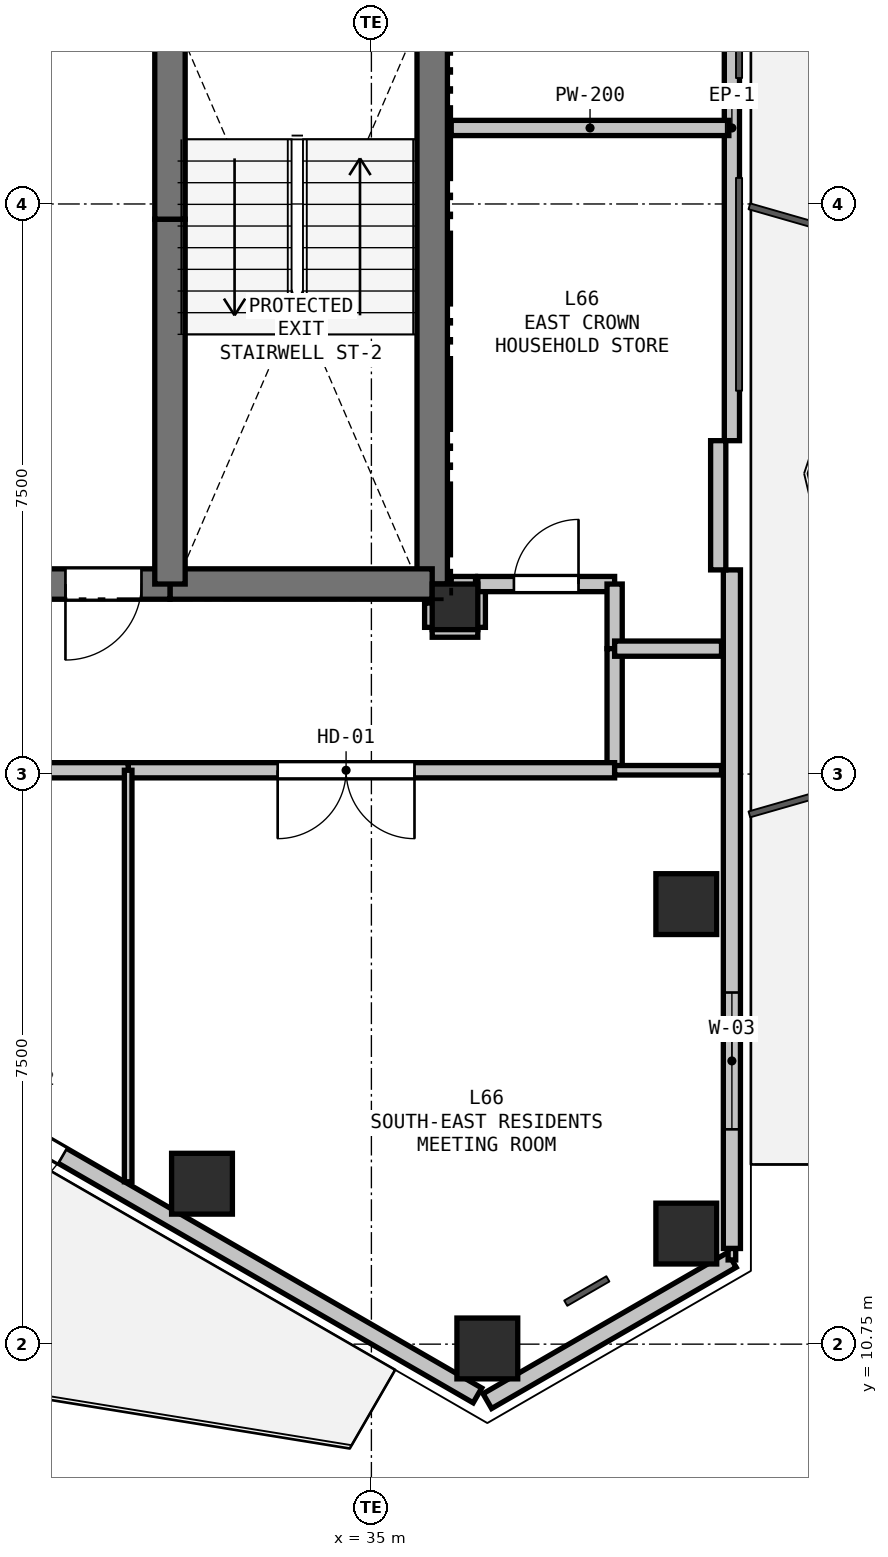
"""IFC4 building model, lengths in metres.
Left out: names, types, materials, properties, quantities, classifications, styles, units other than length and angle.
Written with IfcOpenShell. Run it as: python <this file> out.ifc"""

import sys

from ifc_helpers import new_model, si_unit, direction, frame, frame_2d, origin, origin_2d, place, context, subcontext, project, spatial, rectangle, hollow_rectangle, extrude, element, fill, save


model = new_model("IFC4")
c1 = context("Model", 3, precision=1e-05, world=origin(), true_north=direction((0.0, 1.0)))
c2 = subcontext(c1, "Body", "Model", "MODEL_VIEW")
j1 = project(units=[si_unit("LENGTHUNIT", "METRE"), si_unit("PLANEANGLEUNIT", "RADIAN")], contexts=[c1])
p1 = place(None, origin())
s1 = spatial("IfcSite", under=j1, at=p1, CompositionType="ELEMENT")
p2 = place(p1, origin())
s2 = spatial("IfcBuilding", under=s1, at=p2, CompositionType="ELEMENT")
p3 = place(p2, frame((0.0, 0.0, 236.4)))
s3 = spatial("IfcBuildingStorey", under=s2, at=p3, CompositionType="ELEMENT", Elevation=236.4)
p4 = place(p3, frame((36.1, 20.45, 0.0), z_axis=(0.0, 0.0, 1.0), x_axis=(1.0, 0.0, 0.0)))
e1 = element("IfcColumn", 1, at=p4, inside=s3, PredefinedType="COLUMN", context=c2, shape_type="SweptSolid", body=[
    extrude(rectangle(XDim=0.6, YDim=0.6, at=origin_2d()), origin(), (0.0, 0.0, 1.0), 3.3),
])
for number, where, z_axis, x_axis in (
    (2, (39.143, 16.539, 0.0), (0.0, 0.0, 1.0), (1.0, 0.0, 0.0)),
    (3, (39.143, 12.205, 0.0), (0.0, 0.0, 1.0), (1.0, 0.0, 0.0)),
    (4, (36.525, 10.693, 0.0), (0.0, 0.0, 1.0), (1.0, 0.0, 0.0)),
    (5, (32.771, 12.861, 0.0), (0.0, 0.0, 1.0), (1.0, 0.0, 0.0)),
):
    element("IfcColumn", number, at=place(p3, frame(where, z_axis=z_axis, x_axis=x_axis)), inside=s3, PredefinedType="COLUMN", context=c2, shape_type="SweptSolid", body=[
        extrude(hollow_rectangle(XDim=0.8, YDim=0.8, WallThickness=0.025, at=origin_2d()), origin(), (0.0, 0.0, 1.0), 3.3),
    ])
p5 = place(p3, frame((39.743, 11.858, 0.0), z_axis=(0.0, 0.0, 1.0), x_axis=(-0.866038962515, -0.499976514854, 0.0)))
e6 = element("IfcWall", 6, at=p5, inside=s3, PredefinedType="SOLIDWALL", context=c2, shape_type="SweptSolid", body=[
    extrude(rectangle(XDim=3.716, YDim=0.225, at=frame_2d((1.858, 0.0))), origin(), (0.0, 0.0, 1.0), 2.7),
])
p6 = place(p3, frame((39.743, 30.864, 0.0), z_axis=(0.0, 0.0, 1.0), x_axis=(0.0, -1.0, 0.0)))
e7 = element("IfcWall", 7, at=p6, inside=s3, PredefinedType="PARAPET", context=c2, shape_type="SweptSolid", body=[
    extrude(rectangle(XDim=8.228, YDim=0.2, at=frame_2d((4.114, 0.0))), origin(), (0.0, 0.0, 1.0), 0.2),
])
p7 = place(p3, frame((39.743, 20.936, 0.0), z_axis=(0.0, 0.0, 1.0), x_axis=(0.0, -1.0, 0.0)))
e8 = element("IfcWall", 8, at=p7, inside=s3, PredefinedType="SOLIDWALL", context=c2, shape_type="SweptSolid", body=[
    extrude(rectangle(XDim=8.928, YDim=0.225, at=frame_2d((4.464, 0.0))), origin(), (0.0, 0.0, 1.0), 2.7),
])
p8 = place(p7, frame((5.56, 0.0, 0.9)))
e9 = element("IfcOpeningElement", 9, at=p8, cuts=e8, PredefinedType="OPENING", context=c2, shape_type="SweptSolid", body=[
    extrude(rectangle(XDim=1.8, YDim=1.5, at=frame_2d((0.9, 0.75))), frame((0.0, 0.123, 0.0), z_axis=(0.0, -1.0, 0.0), x_axis=(1.0, 0.0, 0.0)), (0.0, 0.0, 1.0), 0.245),
])
p9 = place(p3, frame((39.563, 22.636, 0.0), z_axis=(0.0, 0.0, 1.0), x_axis=(0.0, -1.0, 0.0)))
e10 = element("IfcWall", 10, at=p9, inside=s3, PredefinedType="PARAPET", context=c2, shape_type="SweptSolid", body=[
    extrude(rectangle(XDim=1.7, YDim=0.2, at=frame_2d((0.85, 0.0))), origin(), (0.0, 0.0, 1.0), 2.7),
])
p10 = place(p3, frame((36.395, 10.076, 0.0), z_axis=(0.0, 0.0, 1.0), x_axis=(-0.866026655105, 0.499997832642, 0.0)))
e11 = element("IfcWall", 11, at=p10, inside=s3, PredefinedType="SOLIDWALL", context=c2, shape_type="SweptSolid", body=[
    extrude(rectangle(XDim=8.928, YDim=0.225, at=frame_2d((4.464, 0.0))), origin(), (0.0, 0.0, 1.0), 2.7),
])
p11 = place(p10, frame((6.302, 0.0, 0.0)))
e12 = element("IfcOpeningElement", 12, at=p11, cuts=e11, PredefinedType="OPENING", context=c2, shape_type="SweptSolid", body=[
    extrude(rectangle(XDim=1.1, YDim=2.1, at=frame_2d((0.55, 1.05))), frame((0.0, 0.123, 0.0), z_axis=(0.0, -1.0, 0.0), x_axis=(1.0, 0.0, 0.0)), (0.0, 0.0, 1.0), 0.245),
])
p12 = place(p3, frame((35.8, 28.1, 0.0), z_axis=(0.0, 0.0, 1.0), x_axis=(0.0, -1.0, 0.0)))
e13 = element("IfcWall", 13, at=p12, inside=s3, PredefinedType="SHEAR", context=c2, shape_type="SweptSolid", body=[
    extrude(rectangle(XDim=7.35, YDim=0.4, at=frame_2d((3.675, 0.0))), origin(), (0.0, 0.0, 1.0), 3.08),
])
p13 = place(p3, frame((35.8, 20.75, 0.0), z_axis=(0.0, 0.0, 1.0), x_axis=(-1.0, 0.0, 0.0)))
e14 = element("IfcWall", 14, at=p13, inside=s3, PredefinedType="SHEAR", context=c2, shape_type="SweptSolid", body=[
    extrude(rectangle(XDim=3.45, YDim=0.4, at=frame_2d((1.725, 0.0))), origin(), (0.0, 0.0, 1.0), 3.08),
])
p14 = place(p3, frame((32.35, 20.75, 0.0), z_axis=(0.0, 0.0, 1.0), x_axis=(-1.0, 0.0, 0.0)))
e15 = element("IfcWall", 15, at=p14, inside=s3, PredefinedType="SHEAR", context=c2, shape_type="SweptSolid", body=[
    extrude(rectangle(XDim=1.75, YDim=0.4, at=frame_2d((0.875, 0.0))), origin(), (0.0, 0.0, 1.0), 3.08),
])
p15 = place(p14, frame((0.375, 0.0, 0.0)))
e16 = element("IfcOpeningElement", 16, at=p15, cuts=e15, PredefinedType="OPENING", context=c2, shape_type="SweptSolid", body=[
    extrude(rectangle(XDim=1.0, YDim=2.15, at=frame_2d((0.5, 1.075))), frame((0.0, 0.21, 0.0), z_axis=(0.0, -1.0, 0.0), x_axis=(1.0, 0.0, 0.0)), (0.0, 0.0, 1.0), 0.42),
])
p16 = place(p3, frame((32.35, 20.75, 0.0), z_axis=(0.0, 0.0, 1.0), x_axis=(0.0, 1.0, 0.0)))
e17 = element("IfcWall", 17, at=p16, inside=s3, PredefinedType="SHEAR", context=c2, shape_type="SweptSolid", body=[
    extrude(rectangle(XDim=4.8, YDim=0.4, at=frame_2d((2.4, 0.0))), origin(), (0.0, 0.0, 1.0), 3.08),
])
p17 = place(p3, frame((32.35, 25.55, 0.0), z_axis=(0.0, 0.0, 1.0), x_axis=(0.0, 1.0, 0.0)))
e18 = element("IfcWall", 18, at=p17, inside=s3, PredefinedType="SHEAR", context=c2, shape_type="SweptSolid", body=[
    extrude(rectangle(XDim=2.4, YDim=0.4, at=frame_2d((1.2, 0.0))), origin(), (0.0, 0.0, 1.0), 3.08),
])
p18 = place(p3, frame((35.8, 20.15, 0.0), z_axis=(0.0, 0.0, 1.0), x_axis=(1.0, 0.0, 0.0)))
e19 = element("IfcWall", 19, at=p18, inside=s3, PredefinedType="PARTITIONING", context=c2, shape_type="SweptSolid", body=[
    extrude(rectangle(XDim=0.6, YDim=0.2, at=frame_2d((0.3, 0.0))), origin(), (0.0, 0.0, 1.0), 2.528),
])
p19 = place(p3, frame((36.4, 20.18, 0.0), z_axis=(0.0, 0.0, 1.0), x_axis=(0.0, 1.0, 0.0)))
e20 = element("IfcWall", 20, at=p19, inside=s3, PredefinedType="PARTITIONING", context=c2, shape_type="SweptSolid", body=[
    extrude(rectangle(XDim=0.57, YDim=0.2, at=frame_2d((0.285, 0.0))), origin(), (0.0, 0.0, 1.0), 3.08),
])
p20 = place(p3, frame((36.4, 20.75, 0.0), z_axis=(0.0, 0.0, 1.0), x_axis=(1.0, 0.0, 0.0)))
e21 = element("IfcWall", 21, at=p20, inside=s3, PredefinedType="PARTITIONING", context=c2, shape_type="SweptSolid", body=[
    extrude(rectangle(XDim=1.8, YDim=0.2, at=frame_2d((0.9, 0.0))), origin(), (0.0, 0.0, 1.0), 3.08),
])
p21 = place(p20, frame((0.475, 0.0, 0.0)))
e22 = element("IfcOpeningElement", 22, at=p21, cuts=e21, PredefinedType="OPENING", context=c2, shape_type="SweptSolid", body=[
    extrude(rectangle(XDim=0.85, YDim=2.1, at=frame_2d((0.425, 1.05))), frame((0.0, 0.11, 0.0), z_axis=(0.0, -1.0, 0.0), x_axis=(1.0, 0.0, 0.0)), (0.0, 0.0, 1.0), 0.22),
])
p22 = place(p3, frame((38.2, 20.75, 0.0), z_axis=(0.0, 0.0, 1.0), x_axis=(0.0, -1.0, 0.0)))
e23 = element("IfcWall", 23, at=p22, inside=s3, PredefinedType="PARTITIONING", context=c2, shape_type="SweptSolid", body=[
    extrude(rectangle(XDim=0.85, YDim=0.2, at=frame_2d((0.425, 0.0))), origin(), (0.0, 0.0, 1.0), 3.08),
])
p23 = place(p3, frame((38.2, 19.9, 0.0), z_axis=(0.0, 0.0, 1.0), x_axis=(0.0, -1.0, 0.0)))
e24 = element("IfcWall", 24, at=p23, inside=s3, PredefinedType="PARTITIONING", context=c2, shape_type="SweptSolid", body=[
    extrude(rectangle(XDim=1.6, YDim=0.2, at=frame_2d((0.8, 0.0))), origin(), (0.0, 0.0, 1.0), 3.08),
])
p24 = place(p3, frame((38.2, 18.3, 0.0), z_axis=(0.0, 0.0, 1.0), x_axis=(-1.0, 0.0, 0.0)))
e25 = element("IfcWall", 25, at=p24, inside=s3, PredefinedType="PARTITIONING", context=c2, shape_type="SweptSolid", body=[
    extrude(rectangle(XDim=6.4, YDim=0.2, at=frame_2d((3.2, 0.0))), origin(), (0.0, 0.0, 1.0), 2.528),
])
p25 = place(p24, frame((2.633, 0.0, 0.0)))
e26 = element("IfcOpeningElement", 26, at=p25, cuts=e25, PredefinedType="OPENING", context=c2, shape_type="SweptSolid", body=[
    extrude(rectangle(XDim=1.8, YDim=2.2, at=frame_2d((0.9, 1.1))), frame((0.0, 0.11, 0.0), z_axis=(0.0, -1.0, 0.0), x_axis=(1.0, 0.0, 0.0)), (0.0, 0.0, 1.0), 0.22),
])
p26 = place(p3, frame((31.8, 18.3, 0.0), z_axis=(0.0, 0.0, 1.0), x_axis=(-1.0, 0.0, 0.0)))
e27 = element("IfcWall", 27, at=p26, inside=s3, PredefinedType="PARTITIONING", context=c2, shape_type="SweptSolid", body=[
    extrude(rectangle(XDim=3.2, YDim=0.2, at=frame_2d((1.6, 0.0))), origin(), (0.0, 0.0, 1.0), 3.08),
])
p27 = place(p26, frame((1.1, 0.0, 0.0)))
e28 = element("IfcOpeningElement", 28, at=p27, cuts=e27, PredefinedType="OPENING", context=c2, shape_type="SweptSolid", body=[
    extrude(rectangle(XDim=1.0, YDim=2.15, at=frame_2d((0.5, 1.075))), frame((0.0, 0.11, 0.0), z_axis=(0.0, -1.0, 0.0), x_axis=(1.0, 0.0, 0.0)), (0.0, 0.0, 1.0), 0.22),
])
p28 = place(p3, frame((35.8, 20.5, 0.0), z_axis=(0.0, 0.0, 1.0), x_axis=(0.0, -1.0, 0.0)))
e29 = element("IfcWall", 29, at=p28, inside=s3, PredefinedType="PARTITIONING", context=c2, shape_type="SweptSolid", body=[
    extrude(rectangle(XDim=0.32, YDim=0.2, at=frame_2d((0.16, 0.0))), origin(), (0.0, 0.0, 1.0), 2.605),
])
p29 = place(p3, frame((31.8, 12.886, 0.0), z_axis=(0.0, 0.0, 1.0), x_axis=(0.0, 1.0, 0.0)))
e30 = element("IfcWall", 30, at=p29, inside=s3, PredefinedType="PARTITIONING", context=c2, shape_type="SweptSolid", body=[
    extrude(rectangle(XDim=5.414, YDim=0.1, at=frame_2d((2.707, 0.0))), origin(), (0.0, 0.0, 1.0), 2.365),
])
p30 = place(p3, frame((38.2, 18.3, 0.0), z_axis=(0.0, 0.0, 1.0), x_axis=(1.0, 0.0, 0.0)))
e31 = element("IfcWall", 31, at=p30, inside=s3, PredefinedType="PARTITIONING", context=c2, shape_type="SweptSolid", body=[
    extrude(rectangle(XDim=1.406, YDim=0.125, at=frame_2d((0.703, 0.0))), origin(), (0.0, 0.0, 1.0), 2.365),
])
p31 = place(p3, frame((39.743, 12.008, 0.0), z_axis=(0.0, 0.0, 1.0), x_axis=(0.0, -1.0, 0.0)))
e32 = element("IfcWall", 32, at=p31, inside=s3, PredefinedType="PARTITIONING", context=c2, shape_type="SweptSolid", body=[
    extrude(rectangle(XDim=0.15, YDim=0.1, at=frame_2d((0.075, 0.0))), origin(), (0.0, 0.0, 1.0), 3.08),
])
p32 = place(p3, frame((39.703, 26.75, 0.0), z_axis=(0.0, 0.0, 1.0), x_axis=(-1.0, 0.0, 0.0)))
e33 = element("IfcWall", 33, at=p32, inside=s3, PredefinedType="PARTITIONING", context=c2, shape_type="SweptSolid", body=[
    extrude(rectangle(XDim=3.653, YDim=0.2, at=frame_2d((1.826, 0.0))), origin(), (0.0, 0.0, 1.0), 2.365),
])
p33 = place(p3, frame((36.37, 20.75, 0.0), z_axis=(0.0, 0.0, 1.0), x_axis=(-1.0, 0.0, 0.0)))
e34 = element("IfcWall", 34, at=p33, inside=s3, PredefinedType="PARTITIONING", context=c2, shape_type="SweptSolid", body=[
    extrude(rectangle(XDim=0.32, YDim=0.2, at=frame_2d((0.16, 0.0))), origin(), (0.0, 0.0, 1.0), 2.605),
])
p34 = place(p3, frame((39.606, 19.9, 0.0), z_axis=(0.0, 0.0, 1.0), x_axis=(-1.0, 0.0, 0.0)))
e35 = element("IfcWall", 35, at=p34, inside=s3, PredefinedType="PARTITIONING", context=c2, shape_type="SweptSolid", body=[
    extrude(rectangle(XDim=1.406, YDim=0.2, at=frame_2d((0.703, 0.0))), origin(), (0.0, 0.0, 1.0), 2.365),
])
p35 = place(p8, origin())
e36 = element("IfcWindow", 36, at=p35, inside=s3, PartitioningType="SINGLE_PANEL", PredefinedType="WINDOW", context=c2, shape_type="SweptSolid", body=[
    extrude(rectangle(XDim=1.8, YDim=1.5, at=frame_2d((0.9, 0.75))), frame((0.0, 0.03, 0.0), z_axis=(0.0, -1.0, 0.0), x_axis=(1.0, 0.0, 0.0)), (0.0, 0.0, 1.0), 0.06),
])
fill(e9, e36)
p36 = place(p11, origin())
e37 = element("IfcDoor", 37, at=p36, inside=s3, OperationType="SINGLE_SWING_RIGHT", PredefinedType="DOOR", context=c2, shape_type="SweptSolid", body=[
    extrude(rectangle(XDim=1.1, YDim=2.1, at=frame_2d((0.55, 1.05))), frame((0.0, 0.025, 0.0), z_axis=(0.0, -1.0, 0.0), x_axis=(1.0, 0.0, 0.0)), (0.0, 0.0, 1.0), 0.05),
])
fill(e12, e37)
p37 = place(p15, origin())
e38 = element("IfcDoor", 38, at=p37, inside=s3, OperationType="SINGLE_SWING_RIGHT", PredefinedType="DOOR", context=c2, shape_type="SweptSolid", body=[
    extrude(rectangle(XDim=1.0, YDim=2.15, at=frame_2d((0.5, 1.075))), frame((0.0, 0.025, 0.0), z_axis=(0.0, -1.0, 0.0), x_axis=(1.0, 0.0, 0.0)), (0.0, 0.0, 1.0), 0.05),
])
fill(e16, e38)
p38 = place(p25, origin())
e39 = element("IfcDoor", 39, at=p38, inside=s3, OperationType="DOUBLE_DOOR_SINGLE_SWING", PredefinedType="DOOR", context=c2, shape_type="SweptSolid", body=[
    extrude(rectangle(XDim=1.8, YDim=2.2, at=frame_2d((0.9, 1.1))), frame((0.0, 0.025, 0.0), z_axis=(0.0, -1.0, 0.0), x_axis=(1.0, 0.0, 0.0)), (0.0, 0.0, 1.0), 0.05),
])
fill(e26, e39)
p39 = place(p21, origin())
e40 = element("IfcDoor", 40, at=p39, inside=s3, OperationType="SINGLE_SWING_RIGHT", PredefinedType="DOOR", context=c2, shape_type="SweptSolid", body=[
    extrude(rectangle(XDim=0.85, YDim=2.1, at=frame_2d((0.425, 1.05))), frame((0.0, 0.025, 0.0), z_axis=(0.0, -1.0, 0.0), x_axis=(1.0, 0.0, 0.0)), (0.0, 0.0, 1.0), 0.05),
])
fill(e22, e40)
save(model, sys.argv[1])
